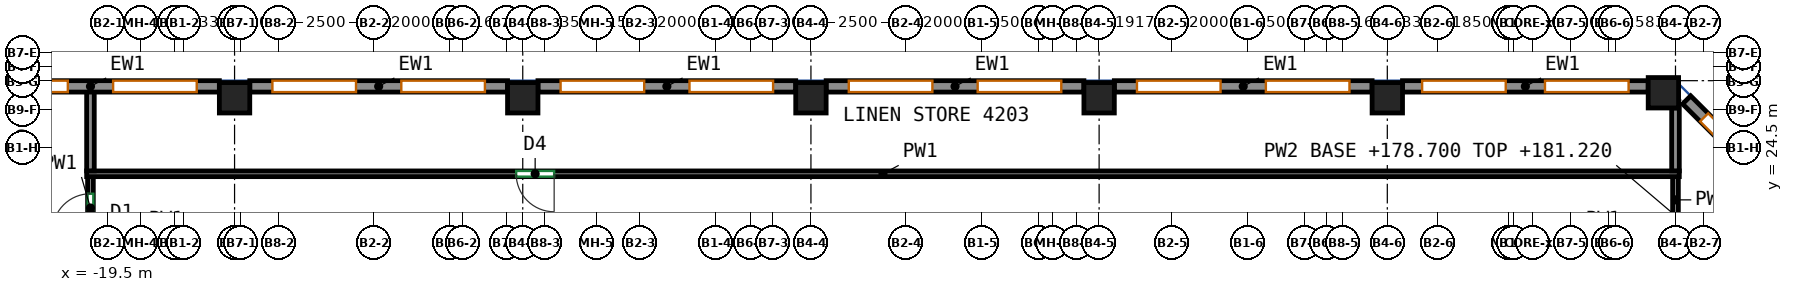
"""IFC4 building model, lengths in metres.
Left out: names, types, materials, properties, quantities, classifications, styles, units other than length and angle.
Written with IfcOpenShell. Run it as: python <this file> out.ifc"""

import sys

from ifc_helpers import new_model, si_unit, direction, frame, frame_2d, origin, origin_2d, place, context, subcontext, project, spatial, rectangle, extrude, source, transform, mapped, element, fill, save


model = new_model("IFC4")
c1 = context("Model", 3, precision=1e-05, world=origin(), true_north=direction((0.0, 1.0)))
c2 = subcontext(c1, "Body", "Model", "MODEL_VIEW")
j1 = project(units=[si_unit("LENGTHUNIT", "METRE"), si_unit("PLANEANGLEUNIT", "RADIAN")], contexts=[c1])
p1 = place(None, origin())
s1 = spatial("IfcSite", under=j1, at=p1, CompositionType="ELEMENT")
p2 = place(p1, origin())
s2 = spatial("IfcBuilding", under=s1, at=p2, CompositionType="ELEMENT")
p3 = place(p2, frame((0.0, 0.0, 178.7)))
s3 = spatial("IfcBuildingStorey", under=s2, at=p3, CompositionType="ELEMENT", Elevation=178.7)
m1 = source(origin(), c2, "Body", "SweptSolid", [
    extrude(rectangle(XDim=0.8, YDim=0.8, at=origin_2d()), origin(), (0.0, 0.0, 1.0), 3.12),
])
for number, where, z_axis, x_axis in (
    (1, (-16.167, 25.8, 0.0), (0.0, 0.0, 1.0), (1.0, 0.0, 0.0)),
    (2, (-8.583, 25.8, 0.0), (0.0, 0.0, 1.0), (1.0, 0.0, 0.0)),
    (3, (-1.0, 25.8, 0.0), (0.0, 0.0, 1.0), (1.0, 0.0, 0.0)),
    (4, (6.583, 25.8, 0.0), (0.0, 0.0, 1.0), (1.0, 0.0, 0.0)),
    (5, (14.167, 25.8, 0.0), (0.0, 0.0, 1.0), (1.0, 0.0, 0.0)),
    (6, (21.432, 25.932, 0.0), (0.0, 0.0, 1.0), (1.0, 0.0, 0.0)),
):
    element("IfcColumn", number, at=place(p3, frame(where, z_axis=z_axis, x_axis=x_axis)), inside=s3, PredefinedType="COLUMN", context=c2, shape_type="MappedRepresentation", body=[
        mapped(m1, transform((0.0, 0.0, 0.0))),
    ])
m2 = source(origin(), c2, "Body", "SweptSolid", [
    extrude(rectangle(XDim=3.5, YDim=0.3, at=frame_2d((1.75, 0.0))), origin(), (0.0, 0.0, 1.0), 3.12),
])
p4 = place(p3, frame((24.519, 23.269, 0.0), z_axis=(0.0, 0.0, 1.0), x_axis=(-0.70707190453, 0.707141656123, 0.0)))
e7 = element("IfcWall", 7, at=p4, inside=s3, PredefinedType="SOLIDWALL", context=c2, shape_type="MappedRepresentation", body=[
    mapped(m2, transform((0.0, 0.0, 0.0))),
])
p5 = place(p4, frame((0.65, 0.0, 0.85)))
e8 = element("IfcOpeningElement", 8, at=p5, cuts=e7, PredefinedType="OPENING", context=c2, shape_type="SweptSolid", body=[
    extrude(rectangle(XDim=2.2, YDim=1.95, at=frame_2d((1.1, 0.975))), frame((0.0, 0.16, 0.0), z_axis=(0.0, -1.0, 0.0), x_axis=(1.0, 0.0, 0.0)), (0.0, 0.0, 1.0), 0.32),
])
m3 = source(origin(), c2, "Body", "SweptSolid", [
    extrude(rectangle(XDim=6.465, YDim=0.3, at=frame_2d((3.232, 0.0))), origin(), (0.0, 0.0, 1.0), 3.12),
])
p6 = place(p3, frame((21.032, 26.1, 0.0), z_axis=(0.0, 0.0, 1.0), x_axis=(-1.0, 0.0, 0.0)))
e9 = element("IfcWall", 9, at=p6, inside=s3, PredefinedType="SOLIDWALL", context=c2, shape_type="MappedRepresentation", body=[
    mapped(m3, transform((0.0, 0.0, 0.0))),
])
p7 = place(p6, frame((0.516, 0.0, 0.85)))
e10 = element("IfcOpeningElement", 10, at=p7, cuts=e9, PredefinedType="OPENING", context=c2, shape_type="SweptSolid", body=[
    extrude(rectangle(XDim=2.2, YDim=1.95, at=frame_2d((1.1, 0.975))), frame((0.0, 0.16, 0.0), z_axis=(0.0, -1.0, 0.0), x_axis=(1.0, 0.0, 0.0)), (0.0, 0.0, 1.0), 0.32),
])
p8 = place(p6, frame((3.749, 0.0, 0.85)))
e11 = element("IfcOpeningElement", 11, at=p8, cuts=e9, PredefinedType="OPENING", context=c2, shape_type="SweptSolid", body=[
    extrude(rectangle(XDim=2.2, YDim=1.95, at=frame_2d((1.1, 0.975))), frame((0.0, 0.16, 0.0), z_axis=(0.0, -1.0, 0.0), x_axis=(1.0, 0.0, 0.0)), (0.0, 0.0, 1.0), 0.32),
])
m4 = source(origin(), c2, "Body", "SweptSolid", [
    extrude(rectangle(XDim=6.783, YDim=0.3, at=frame_2d((3.392, 0.0))), origin(), (0.0, 0.0, 1.0), 3.12),
])
p9 = place(p3, frame((13.767, 26.1, 0.0), z_axis=(0.0, 0.0, 1.0), x_axis=(-1.0, 0.0, 0.0)))
e12 = element("IfcWall", 12, at=p9, inside=s3, PredefinedType="SOLIDWALL", context=c2, shape_type="MappedRepresentation", body=[
    mapped(m4, transform((0.0, 0.0, 0.0))),
])
p10 = place(p9, frame((0.596, 0.0, 0.85)))
e13 = element("IfcOpeningElement", 13, at=p10, cuts=e12, PredefinedType="OPENING", context=c2, shape_type="SweptSolid", body=[
    extrude(rectangle(XDim=2.2, YDim=1.95, at=frame_2d((1.1, 0.975))), frame((0.0, 0.16, 0.0), z_axis=(0.0, -1.0, 0.0), x_axis=(1.0, 0.0, 0.0)), (0.0, 0.0, 1.0), 0.32),
])
p11 = place(p9, frame((3.988, 0.0, 0.85)))
e14 = element("IfcOpeningElement", 14, at=p11, cuts=e12, PredefinedType="OPENING", context=c2, shape_type="SweptSolid", body=[
    extrude(rectangle(XDim=2.2, YDim=1.95, at=frame_2d((1.1, 0.975))), frame((0.0, 0.16, 0.0), z_axis=(0.0, -1.0, 0.0), x_axis=(1.0, 0.0, 0.0)), (0.0, 0.0, 1.0), 0.32),
])
m5 = source(origin(), c2, "Body", "SweptSolid", [
    extrude(rectangle(XDim=6.783, YDim=0.3, at=frame_2d((3.392, 0.0))), origin(), (0.0, 0.0, 1.0), 3.12),
])
p12 = place(p3, frame((6.183, 26.1, 0.0), z_axis=(0.0, 0.0, 1.0), x_axis=(-1.0, 0.0, 0.0)))
e15 = element("IfcWall", 15, at=p12, inside=s3, PredefinedType="SOLIDWALL", context=c2, shape_type="MappedRepresentation", body=[
    mapped(m5, transform((0.0, 0.0, 0.0))),
])
p13 = place(p12, frame((0.596, 0.0, 0.85)))
e16 = element("IfcOpeningElement", 16, at=p13, cuts=e15, PredefinedType="OPENING", context=c2, shape_type="SweptSolid", body=[
    extrude(rectangle(XDim=2.2, YDim=1.95, at=frame_2d((1.1, 0.975))), frame((0.0, 0.16, 0.0), z_axis=(0.0, -1.0, 0.0), x_axis=(1.0, 0.0, 0.0)), (0.0, 0.0, 1.0), 0.32),
])
p14 = place(p12, frame((3.988, 0.0, 0.85)))
e17 = element("IfcOpeningElement", 17, at=p14, cuts=e15, PredefinedType="OPENING", context=c2, shape_type="SweptSolid", body=[
    extrude(rectangle(XDim=2.2, YDim=1.95, at=frame_2d((1.1, 0.975))), frame((0.0, 0.16, 0.0), z_axis=(0.0, -1.0, 0.0), x_axis=(1.0, 0.0, 0.0)), (0.0, 0.0, 1.0), 0.32),
])
p15 = place(p3, frame((-1.4, 26.1, 0.0), z_axis=(0.0, 0.0, 1.0), x_axis=(-1.0, 0.0, 0.0)))
e18 = element("IfcWall", 18, at=p15, inside=s3, PredefinedType="SOLIDWALL", context=c2, shape_type="MappedRepresentation", body=[
    mapped(m5, transform((0.0, 0.0, 0.0))),
])
p16 = place(p15, frame((0.596, 0.0, 0.85)))
e19 = element("IfcOpeningElement", 19, at=p16, cuts=e18, PredefinedType="OPENING", context=c2, shape_type="SweptSolid", body=[
    extrude(rectangle(XDim=2.2, YDim=1.95, at=frame_2d((1.1, 0.975))), frame((0.0, 0.16, 0.0), z_axis=(0.0, -1.0, 0.0), x_axis=(1.0, 0.0, 0.0)), (0.0, 0.0, 1.0), 0.32),
])
p17 = place(p15, frame((3.988, 0.0, 0.85)))
e20 = element("IfcOpeningElement", 20, at=p17, cuts=e18, PredefinedType="OPENING", context=c2, shape_type="SweptSolid", body=[
    extrude(rectangle(XDim=2.2, YDim=1.95, at=frame_2d((1.1, 0.975))), frame((0.0, 0.16, 0.0), z_axis=(0.0, -1.0, 0.0), x_axis=(1.0, 0.0, 0.0)), (0.0, 0.0, 1.0), 0.32),
])
p18 = place(p3, frame((-8.983, 26.1, 0.0), z_axis=(0.0, 0.0, 1.0), x_axis=(-1.0, 0.0, 0.0)))
e21 = element("IfcWall", 21, at=p18, inside=s3, PredefinedType="SOLIDWALL", context=c2, shape_type="MappedRepresentation", body=[
    mapped(m4, transform((0.0, 0.0, 0.0))),
])
p19 = place(p18, frame((0.596, 0.0, 0.85)))
e22 = element("IfcOpeningElement", 22, at=p19, cuts=e21, PredefinedType="OPENING", context=c2, shape_type="SweptSolid", body=[
    extrude(rectangle(XDim=2.2, YDim=1.95, at=frame_2d((1.1, 0.975))), frame((0.0, 0.16, 0.0), z_axis=(0.0, -1.0, 0.0), x_axis=(1.0, 0.0, 0.0)), (0.0, 0.0, 1.0), 0.32),
])
p20 = place(p18, frame((3.988, 0.0, 0.85)))
e23 = element("IfcOpeningElement", 23, at=p20, cuts=e21, PredefinedType="OPENING", context=c2, shape_type="SweptSolid", body=[
    extrude(rectangle(XDim=2.2, YDim=1.95, at=frame_2d((1.1, 0.975))), frame((0.0, 0.16, 0.0), z_axis=(0.0, -1.0, 0.0), x_axis=(1.0, 0.0, 0.0)), (0.0, 0.0, 1.0), 0.32),
])
p21 = place(p3, frame((-16.567, 26.1, 0.0), z_axis=(0.0, 0.0, 1.0), x_axis=(-1.0, 0.0, 0.0)))
e24 = element("IfcWall", 24, at=p21, inside=s3, PredefinedType="SOLIDWALL", context=c2, shape_type="MappedRepresentation", body=[
    mapped(m5, transform((0.0, 0.0, 0.0))),
])
p22 = place(p21, frame((0.596, 0.0, 0.85)))
e25 = element("IfcOpeningElement", 25, at=p22, cuts=e24, PredefinedType="OPENING", context=c2, shape_type="SweptSolid", body=[
    extrude(rectangle(XDim=2.2, YDim=1.95, at=frame_2d((1.1, 0.975))), frame((0.0, 0.16, 0.0), z_axis=(0.0, -1.0, 0.0), x_axis=(1.0, 0.0, 0.0)), (0.0, 0.0, 1.0), 0.32),
])
p23 = place(p21, frame((3.988, 0.0, 0.85)))
e26 = element("IfcOpeningElement", 26, at=p23, cuts=e24, PredefinedType="OPENING", context=c2, shape_type="SweptSolid", body=[
    extrude(rectangle(XDim=2.2, YDim=1.95, at=frame_2d((1.1, 0.975))), frame((0.0, 0.16, 0.0), z_axis=(0.0, -1.0, 0.0), x_axis=(1.0, 0.0, 0.0)), (0.0, 0.0, 1.0), 0.32),
])
p24 = place(p3, frame((-19.959, 22.075, 0.0), z_axis=(0.0, 0.0, 1.0), x_axis=(0.0, 1.0, 0.0)))
e27 = element("IfcWall", 27, at=p24, inside=s3, PredefinedType="PARTITIONING", context=c2, shape_type="SweptSolid", body=[
    extrude(rectangle(XDim=1.65, YDim=0.15, at=frame_2d((0.825, 0.0))), origin(), (0.0, 0.0, 1.0), 3.12),
])
p25 = place(p24, frame((0.2, 0.0, 0.0)))
e28 = element("IfcOpeningElement", 28, at=p25, cuts=e27, PredefinedType="OPENING", context=c2, shape_type="SweptSolid", body=[
    extrude(rectangle(XDim=1.0, YDim=2.1, at=frame_2d((0.5, 1.05))), frame((0.0, 0.085, 0.0), z_axis=(0.0, -1.0, 0.0), x_axis=(1.0, 0.0, 0.0)), (0.0, 0.0, 1.0), 0.17),
])
p26 = place(p3, frame((21.75, 22.503, 0.0), z_axis=(0.0, 0.0, 1.0), x_axis=(0.0, 1.0, 0.0)))
e29 = element("IfcWall", 29, at=p26, inside=s3, PredefinedType="PARTITIONING", context=c2, shape_type="SweptSolid", body=[
    extrude(rectangle(XDim=1.222, YDim=0.15, at=frame_2d((0.611, 0.0))), origin(), (0.0, 0.0, 1.0), 3.12),
])
p27 = place(p3, frame((21.85, 23.8, 0.0), z_axis=(0.0, 0.0, 1.0), x_axis=(-1.0, 0.0, 0.0)))
e30 = element("IfcWall", 30, at=p27, inside=s3, PredefinedType="PARTITIONING", context=c2, shape_type="SweptSolid", body=[
    extrude(rectangle(XDim=41.909, YDim=0.15, at=frame_2d((20.955, 0.0))), origin(), (0.0, 0.0, 1.0), 3.12),
])
p28 = place(p27, frame((29.607, 0.0, 0.0)))
e31 = element("IfcOpeningElement", 31, at=p28, cuts=e30, PredefinedType="OPENING", context=c2, shape_type="SweptSolid", body=[
    extrude(rectangle(XDim=1.0, YDim=2.1, at=frame_2d((0.5, 1.05))), frame((0.0, 0.085, 0.0), z_axis=(0.0, -1.0, 0.0), x_axis=(1.0, 0.0, 0.0)), (0.0, 0.0, 1.0), 0.17),
])
p29 = place(p3, frame((-19.959, 23.877, 0.0), z_axis=(0.0, 0.0, 1.0), x_axis=(0.0, 1.0, 0.0)))
e32 = element("IfcWall", 32, at=p29, inside=s3, PredefinedType="PARTITIONING", context=c2, shape_type="SweptSolid", body=[
    extrude(rectangle(XDim=2.123, YDim=0.2, at=frame_2d((1.062, 0.0))), origin(), (0.0, 0.0, 1.0), 3.12),
])
p30 = place(p3, frame((21.75, 25.532, 0.0), z_axis=(0.0, 0.0, 1.0), x_axis=(0.0, -1.0, 0.0)))
e33 = element("IfcWall", 33, at=p30, inside=s3, PredefinedType="PARTITIONING", context=c2, shape_type="SweptSolid", body=[
    extrude(rectangle(XDim=1.655, YDim=0.2, at=frame_2d((0.828, 0.0))), origin(), (0.0, 0.0, 1.0), 3.12),
])
p31 = place(p5, origin())
e34 = element("IfcWindow", 34, at=p31, inside=s3, PartitioningType="SINGLE_PANEL", PredefinedType="WINDOW", context=c2, shape_type="SweptSolid", body=[
    extrude(rectangle(XDim=2.2, YDim=1.95, at=frame_2d((1.1, 0.975))), frame((0.0, 0.03, 0.0), z_axis=(0.0, -1.0, 0.0), x_axis=(1.0, 0.0, 0.0)), (0.0, 0.0, 1.0), 0.06),
])
fill(e8, e34)
p32 = place(p7, origin())
e35 = element("IfcWindow", 35, at=p32, inside=s3, PartitioningType="SINGLE_PANEL", PredefinedType="WINDOW", context=c2, shape_type="SweptSolid", body=[
    extrude(rectangle(XDim=2.2, YDim=1.95, at=frame_2d((1.1, 0.975))), frame((0.0, 0.03, 0.0), z_axis=(0.0, -1.0, 0.0), x_axis=(1.0, 0.0, 0.0)), (0.0, 0.0, 1.0), 0.06),
])
fill(e10, e35)
p33 = place(p8, origin())
e36 = element("IfcWindow", 36, at=p33, inside=s3, PartitioningType="SINGLE_PANEL", PredefinedType="WINDOW", context=c2, shape_type="SweptSolid", body=[
    extrude(rectangle(XDim=2.2, YDim=1.95, at=frame_2d((1.1, 0.975))), frame((0.0, 0.03, 0.0), z_axis=(0.0, -1.0, 0.0), x_axis=(1.0, 0.0, 0.0)), (0.0, 0.0, 1.0), 0.06),
])
fill(e11, e36)
p34 = place(p10, origin())
e37 = element("IfcWindow", 37, at=p34, inside=s3, PartitioningType="SINGLE_PANEL", PredefinedType="WINDOW", context=c2, shape_type="SweptSolid", body=[
    extrude(rectangle(XDim=2.2, YDim=1.95, at=frame_2d((1.1, 0.975))), frame((0.0, 0.03, 0.0), z_axis=(0.0, -1.0, 0.0), x_axis=(1.0, 0.0, 0.0)), (0.0, 0.0, 1.0), 0.06),
])
fill(e13, e37)
p35 = place(p11, origin())
e38 = element("IfcWindow", 38, at=p35, inside=s3, PartitioningType="SINGLE_PANEL", PredefinedType="WINDOW", context=c2, shape_type="SweptSolid", body=[
    extrude(rectangle(XDim=2.2, YDim=1.95, at=frame_2d((1.1, 0.975))), frame((0.0, 0.03, 0.0), z_axis=(0.0, -1.0, 0.0), x_axis=(1.0, 0.0, 0.0)), (0.0, 0.0, 1.0), 0.06),
])
fill(e14, e38)
p36 = place(p13, origin())
e39 = element("IfcWindow", 39, at=p36, inside=s3, PartitioningType="SINGLE_PANEL", PredefinedType="WINDOW", context=c2, shape_type="SweptSolid", body=[
    extrude(rectangle(XDim=2.2, YDim=1.95, at=frame_2d((1.1, 0.975))), frame((0.0, 0.03, 0.0), z_axis=(0.0, -1.0, 0.0), x_axis=(1.0, 0.0, 0.0)), (0.0, 0.0, 1.0), 0.06),
])
fill(e16, e39)
p37 = place(p14, origin())
e40 = element("IfcWindow", 40, at=p37, inside=s3, PartitioningType="SINGLE_PANEL", PredefinedType="WINDOW", context=c2, shape_type="SweptSolid", body=[
    extrude(rectangle(XDim=2.2, YDim=1.95, at=frame_2d((1.1, 0.975))), frame((0.0, 0.03, 0.0), z_axis=(0.0, -1.0, 0.0), x_axis=(1.0, 0.0, 0.0)), (0.0, 0.0, 1.0), 0.06),
])
fill(e17, e40)
p38 = place(p16, origin())
e41 = element("IfcWindow", 41, at=p38, inside=s3, PartitioningType="SINGLE_PANEL", PredefinedType="WINDOW", context=c2, shape_type="SweptSolid", body=[
    extrude(rectangle(XDim=2.2, YDim=1.95, at=frame_2d((1.1, 0.975))), frame((0.0, 0.03, 0.0), z_axis=(0.0, -1.0, 0.0), x_axis=(1.0, 0.0, 0.0)), (0.0, 0.0, 1.0), 0.06),
])
fill(e19, e41)
p39 = place(p17, origin())
e42 = element("IfcWindow", 42, at=p39, inside=s3, PartitioningType="SINGLE_PANEL", PredefinedType="WINDOW", context=c2, shape_type="SweptSolid", body=[
    extrude(rectangle(XDim=2.2, YDim=1.95, at=frame_2d((1.1, 0.975))), frame((0.0, 0.03, 0.0), z_axis=(0.0, -1.0, 0.0), x_axis=(1.0, 0.0, 0.0)), (0.0, 0.0, 1.0), 0.06),
])
fill(e20, e42)
p40 = place(p19, origin())
e43 = element("IfcWindow", 43, at=p40, inside=s3, PartitioningType="SINGLE_PANEL", PredefinedType="WINDOW", context=c2, shape_type="SweptSolid", body=[
    extrude(rectangle(XDim=2.2, YDim=1.95, at=frame_2d((1.1, 0.975))), frame((0.0, 0.03, 0.0), z_axis=(0.0, -1.0, 0.0), x_axis=(1.0, 0.0, 0.0)), (0.0, 0.0, 1.0), 0.06),
])
fill(e22, e43)
p41 = place(p20, origin())
e44 = element("IfcWindow", 44, at=p41, inside=s3, PartitioningType="SINGLE_PANEL", PredefinedType="WINDOW", context=c2, shape_type="SweptSolid", body=[
    extrude(rectangle(XDim=2.2, YDim=1.95, at=frame_2d((1.1, 0.975))), frame((0.0, 0.03, 0.0), z_axis=(0.0, -1.0, 0.0), x_axis=(1.0, 0.0, 0.0)), (0.0, 0.0, 1.0), 0.06),
])
fill(e23, e44)
p42 = place(p22, origin())
e45 = element("IfcWindow", 45, at=p42, inside=s3, PartitioningType="SINGLE_PANEL", PredefinedType="WINDOW", context=c2, shape_type="SweptSolid", body=[
    extrude(rectangle(XDim=2.2, YDim=1.95, at=frame_2d((1.1, 0.975))), frame((0.0, 0.03, 0.0), z_axis=(0.0, -1.0, 0.0), x_axis=(1.0, 0.0, 0.0)), (0.0, 0.0, 1.0), 0.06),
])
fill(e25, e45)
p43 = place(p23, origin())
e46 = element("IfcWindow", 46, at=p43, inside=s3, PartitioningType="SINGLE_PANEL", PredefinedType="WINDOW", context=c2, shape_type="SweptSolid", body=[
    extrude(rectangle(XDim=2.2, YDim=1.95, at=frame_2d((1.1, 0.975))), frame((0.0, 0.03, 0.0), z_axis=(0.0, -1.0, 0.0), x_axis=(1.0, 0.0, 0.0)), (0.0, 0.0, 1.0), 0.06),
])
fill(e26, e46)
p44 = place(p25, origin())
e47 = element("IfcDoor", 47, at=p44, inside=s3, OperationType="SINGLE_SWING_LEFT", PredefinedType="DOOR", context=c2, shape_type="SweptSolid", body=[
    extrude(rectangle(XDim=1.0, YDim=2.1, at=frame_2d((0.5, 1.05))), frame((0.0, 0.025, 0.0), z_axis=(0.0, -1.0, 0.0), x_axis=(1.0, 0.0, 0.0)), (0.0, 0.0, 1.0), 0.05),
])
fill(e28, e47)
p45 = place(p28, origin())
e48 = element("IfcDoor", 48, at=p45, inside=s3, OperationType="SINGLE_SWING_LEFT", PredefinedType="DOOR", context=c2, shape_type="SweptSolid", body=[
    extrude(rectangle(XDim=1.0, YDim=2.1, at=frame_2d((0.5, 1.05))), frame((0.0, 0.025, 0.0), z_axis=(0.0, -1.0, 0.0), x_axis=(1.0, 0.0, 0.0)), (0.0, 0.0, 1.0), 0.05),
])
fill(e31, e48)
save(model, sys.argv[1])
